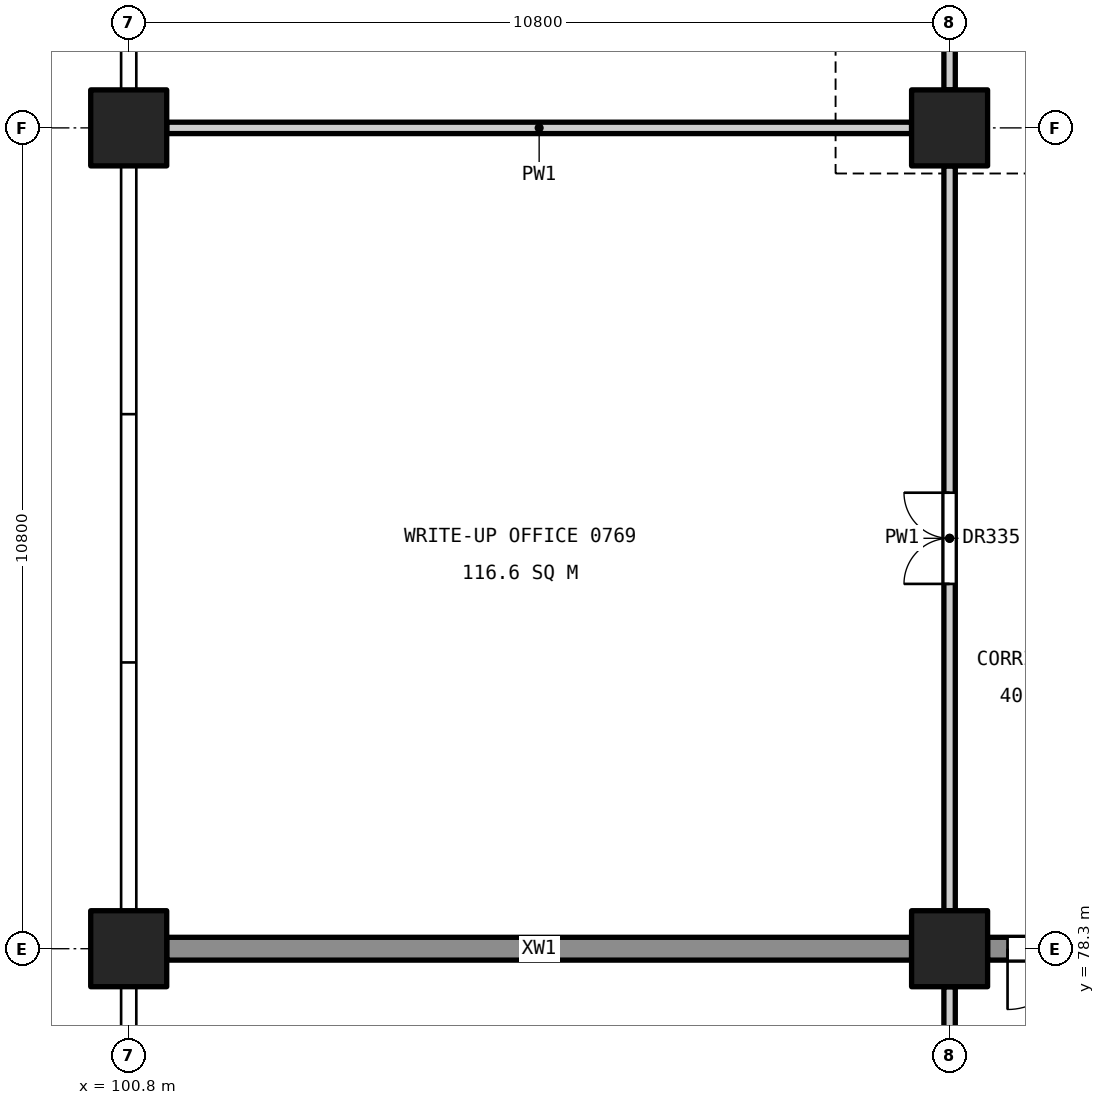
"""IFC4 building model, lengths in metres.
Left out: names, types, materials, properties, quantities, classifications, styles, units other than length and angle.
Written with IfcOpenShell. Run it as: python <this file> out.ifc"""

import sys

from ifc_helpers import new_model, si_unit, direction, frame, frame_2d, origin, origin_2d, place, context, subcontext, project, spatial, rectangle, extrude, element, fill, save


model = new_model("IFC4")
c1 = context("Model", 3, precision=1e-05, world=origin(), true_north=direction((0.0, 1.0)))
c2 = subcontext(c1, "Body", "Model", "MODEL_VIEW")
j1 = project(units=[si_unit("LENGTHUNIT", "METRE"), si_unit("PLANEANGLEUNIT", "RADIAN")], contexts=[c1])
p1 = place(None, origin())
s1 = spatial("IfcSite", under=j1, at=p1, CompositionType="ELEMENT")
p2 = place(p1, origin())
s2 = spatial("IfcBuilding", under=s1, at=p2, CompositionType="ELEMENT")
p3 = place(p2, frame((0.0, 0.0, 36.6)))
s3 = spatial("IfcBuildingStorey", under=s2, at=p3, CompositionType="ELEMENT", Elevation=36.6)
for number, where, z_axis, x_axis in (
    (1, (111.6, 78.3, 0.0), (0.0, 0.0, 1.0), (1.0, 0.0, 0.0)),
    (2, (111.6, 89.1, 0.0), (0.0, 0.0, 1.0), (1.0, 0.0, 0.0)),
    (3, (100.8, 78.3, 0.0), (0.0, 0.0, 1.0), (1.0, 0.0, 0.0)),
    (4, (100.8, 89.1, 0.0), (0.0, 0.0, 1.0), (1.0, 0.0, 0.0)),
):
    element("IfcColumn", number, at=place(p3, frame(where, z_axis=z_axis, x_axis=x_axis)), inside=s3, PredefinedType="COLUMN", context=c2, shape_type="SweptSolid", body=[
        extrude(rectangle(XDim=1.0, YDim=1.0, at=origin_2d()), origin(), (0.0, 0.0, 1.0), 4.8),
    ])
p4 = place(p3, frame((118.3, 78.3, 0.0), z_axis=(0.0, 0.0, 1.0), x_axis=(-1.0, 0.0, 0.0)))
e5 = element("IfcWall", 5, at=p4, inside=s3, PredefinedType="SHEAR", context=c2, shape_type="SweptSolid", body=[
    extrude(rectangle(XDim=6.2, YDim=0.3, at=frame_2d((3.1, 0.0))), origin(), (0.0, 0.0, 1.0), 4.55),
])
p5 = place(p4, frame((4.337, 0.0, 0.0)))
e6 = element("IfcOpeningElement", 6, at=p5, cuts=e5, PredefinedType="OPENING", context=c2, shape_type="SweptSolid", body=[
    extrude(rectangle(XDim=1.6, YDim=2.1, at=frame_2d((0.8, 1.05))), frame((0.0, 0.16, 0.0), z_axis=(0.0, -1.0, 0.0), x_axis=(1.0, 0.0, 0.0)), (0.0, 0.0, 1.0), 0.32),
])
p6 = place(p3, frame((111.1, 78.3, 0.0), z_axis=(0.0, 0.0, 1.0), x_axis=(-1.0, 0.0, 0.0)))
e7 = element("IfcWall", 7, at=p6, inside=s3, PredefinedType="SHEAR", context=c2, shape_type="SweptSolid", body=[
    extrude(rectangle(XDim=9.8, YDim=0.3, at=frame_2d((4.9, 0.0))), origin(), (0.0, 0.0, 1.0), 4.55),
])
p7 = place(p3, frame((111.6, 70.8, 0.0), z_axis=(0.0, 0.0, 1.0), x_axis=(0.0, 1.0, 0.0)))
e8 = element("IfcWall", 8, at=p7, inside=s3, PredefinedType="PARTITIONING", context=c2, shape_type="SweptSolid", body=[
    extrude(rectangle(XDim=7.0, YDim=0.15, at=frame_2d((3.5, 0.0))), origin(), (0.0, 0.0, 1.0), 3.55),
])
p8 = place(p7, frame((2.9, 0.0, 0.0)))
e9 = element("IfcOpeningElement", 9, at=p8, cuts=e8, PredefinedType="OPENING", context=c2, shape_type="SweptSolid", body=[
    extrude(rectangle(XDim=1.2, YDim=2.1, at=frame_2d((0.6, 1.05))), frame((0.0, 0.085, 0.0), z_axis=(0.0, -1.0, 0.0), x_axis=(1.0, 0.0, 0.0)), (0.0, 0.0, 1.0), 0.17),
])
p9 = place(p3, frame((111.6, 78.8, 0.0), z_axis=(0.0, 0.0, 1.0), x_axis=(0.0, 1.0, 0.0)))
e10 = element("IfcWall", 10, at=p9, inside=s3, PredefinedType="PARTITIONING", context=c2, shape_type="SweptSolid", body=[
    extrude(rectangle(XDim=9.8, YDim=0.15, at=frame_2d((4.9, 0.0))), origin(), (0.0, 0.0, 1.0), 3.55),
])
p10 = place(p9, frame((4.3, 0.0, 0.0)))
e11 = element("IfcOpeningElement", 11, at=p10, cuts=e10, PredefinedType="OPENING", context=c2, shape_type="SweptSolid", body=[
    extrude(rectangle(XDim=1.2, YDim=2.1, at=frame_2d((0.6, 1.05))), frame((0.0, 0.085, 0.0), z_axis=(0.0, -1.0, 0.0), x_axis=(1.0, 0.0, 0.0)), (0.0, 0.0, 1.0), 0.17),
])
p11 = place(p3, frame((111.6, 89.6, 0.0), z_axis=(0.0, 0.0, 1.0), x_axis=(0.0, 1.0, 0.0)))
e12 = element("IfcWall", 12, at=p11, inside=s3, PredefinedType="PARTITIONING", context=c2, shape_type="SweptSolid", body=[
    extrude(rectangle(XDim=3.5, YDim=0.15, at=frame_2d((1.75, 0.0))), origin(), (0.0, 0.0, 1.0), 3.55),
])
p12 = place(p11, frame((1.15, 0.0, 0.0)))
e13 = element("IfcOpeningElement", 13, at=p12, cuts=e12, PredefinedType="OPENING", context=c2, shape_type="SweptSolid", body=[
    extrude(rectangle(XDim=1.2, YDim=2.1, at=frame_2d((0.6, 1.05))), frame((0.0, 0.085, 0.0), z_axis=(0.0, -1.0, 0.0), x_axis=(1.0, 0.0, 0.0)), (0.0, 0.0, 1.0), 0.17),
])
p13 = place(p3, frame((111.1, 89.1, 0.0), z_axis=(0.0, 0.0, 1.0), x_axis=(-1.0, 0.0, 0.0)))
e14 = element("IfcWall", 14, at=p13, inside=s3, PredefinedType="PARTITIONING", context=c2, shape_type="SweptSolid", body=[
    extrude(rectangle(XDim=9.8, YDim=0.15, at=frame_2d((4.9, 0.0))), origin(), (0.0, 0.0, 1.0), 3.85),
])
p14 = place(p10, origin())
e15 = element("IfcDoor", 15, at=p14, inside=s3, OperationType="DOUBLE_DOOR_SINGLE_SWING", PredefinedType="DOOR", context=c2, shape_type="SweptSolid", body=[
    extrude(rectangle(XDim=1.2, YDim=2.1, at=frame_2d((0.6, 1.05))), frame((0.0, 0.025, 0.0), z_axis=(0.0, -1.0, 0.0), x_axis=(1.0, 0.0, 0.0)), (0.0, 0.0, 1.0), 0.05),
])
fill(e11, e15)
p15 = place(p5, origin())
e16 = element("IfcDoor", 16, at=p15, inside=s3, OperationType="DOUBLE_DOOR_SINGLE_SWING", PredefinedType="DOOR", context=c2, shape_type="SweptSolid", body=[
    extrude(rectangle(XDim=1.6, YDim=2.1, at=frame_2d((0.8, 1.05))), frame((0.0, 0.025, 0.0), z_axis=(0.0, -1.0, 0.0), x_axis=(1.0, 0.0, 0.0)), (0.0, 0.0, 1.0), 0.05),
])
fill(e6, e16)
save(model, sys.argv[1])
